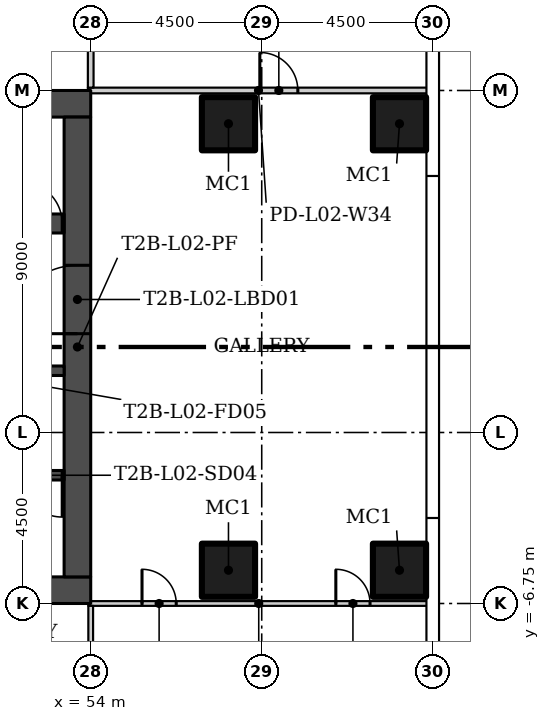
"""IFC4 building model, lengths in metres.
Left out: names, types, materials, properties, quantities, classifications, styles, units other than length and angle.
Written with IfcOpenShell. Run it as: python <this file> out.ifc"""

import sys

from ifc_helpers import new_model, si_unit, direction, frame, frame_2d, origin, origin_2d, place, context, subcontext, project, spatial, rectangle, hollow_rectangle, extrude, element, fill, save


model = new_model("IFC4")
c1 = context("Model", 3, precision=1e-05, world=origin(), true_north=direction((0.0, 1.0)))
c2 = subcontext(c1, "Body", "Model", "MODEL_VIEW")
j1 = project(units=[si_unit("LENGTHUNIT", "METRE"), si_unit("PLANEANGLEUNIT", "RADIAN")], contexts=[c1])
p1 = place(None, origin())
s1 = spatial("IfcSite", under=j1, at=p1, CompositionType="ELEMENT")
p2 = place(p1, origin())
s2 = spatial("IfcBuilding", under=s1, at=p2, CompositionType="ELEMENT")
p3 = place(p2, frame((0.0, 0.0, 12.5)))
s3 = spatial("IfcBuildingStorey", under=s2, at=p3, CompositionType="ELEMENT", Elevation=12.5)
for number, where in (
    (1, (57.625, -5.875, 0.0)),
    (2, (62.125, -5.875, 0.0)),
    (3, (57.625, 5.875, 0.0)),
    (4, (62.125, 5.875, 0.0)),
):
    element("IfcColumn", number, at=place(p3, frame(where)), inside=s3, PredefinedType="COLUMN", context=c2, shape_type="SweptSolid", body=[
        extrude(hollow_rectangle(XDim=1.4, YDim=1.4, WallThickness=0.06, at=origin_2d()), origin(), (0.0, 0.0, 1.0), 5.6),
    ])
p4 = place(p3, frame((53.938, -6.75, 0.0)))
e5 = element("IfcWall", 5, at=p4, inside=s3, PredefinedType="PARTITIONING", context=c2, shape_type="SweptSolid", body=[
    extrude(rectangle(XDim=8.968, YDim=0.125, at=frame_2d((4.484, 0.0))), origin(), (0.0, 0.0, 1.0), 5.6),
])
p5 = place(p4, frame((1.413, 0.0, 0.0)))
e6 = element("IfcOpeningElement", 6, at=p5, cuts=e5, PredefinedType="OPENING", context=c2, shape_type="SweptSolid", body=[
    extrude(rectangle(XDim=0.9, YDim=2.1, at=frame_2d((0.45, 1.05))), frame((0.0, 0.073, 0.0), z_axis=(0.0, -1.0, 0.0), x_axis=(1.0, 0.0, 0.0)), (0.0, 0.0, 1.0), 0.145),
])
p6 = place(p4, frame((6.512, 0.0, 0.0)))
e7 = element("IfcOpeningElement", 7, at=p6, cuts=e5, PredefinedType="OPENING", context=c2, shape_type="SweptSolid", body=[
    extrude(rectangle(XDim=0.9, YDim=2.1, at=frame_2d((0.45, 1.05))), frame((0.0, 0.073, 0.0), z_axis=(0.0, -1.0, 0.0), x_axis=(1.0, 0.0, 0.0)), (0.0, 0.0, 1.0), 0.145),
])
p7 = place(p3, frame((53.925, 6.75, 0.0)))
e8 = element("IfcWall", 8, at=p7, inside=s3, PredefinedType="PARTITIONING", context=c2, shape_type="SweptSolid", body=[
    extrude(rectangle(XDim=8.98, YDim=0.15, at=frame_2d((4.49, 0.0))), origin(), (0.0, 0.0, 1.0), 5.6),
])
p8 = place(p7, frame((4.525, 0.0, 0.0)))
e9 = element("IfcOpeningElement", 9, at=p8, cuts=e8, PredefinedType="OPENING", context=c2, shape_type="SweptSolid", body=[
    extrude(rectangle(XDim=1.0, YDim=2.4, at=frame_2d((0.5, 1.2))), frame((0.0, 0.085, 0.0), z_axis=(0.0, -1.0, 0.0), x_axis=(1.0, 0.0, 0.0)), (0.0, 0.0, 1.0), 0.17),
])
p9 = place(p3, frame((54.0, -6.812, 0.0), z_axis=(0.0, 0.0, 1.0), x_axis=(0.0, -1.0, 0.0)))
e10 = element("IfcWall", 10, at=p9, inside=s3, PredefinedType="PARTITIONING", context=c2, shape_type="SweptSolid", body=[
    extrude(rectangle(XDim=13.337, YDim=0.125, at=frame_2d((6.669, 0.0))), origin(), (0.0, 0.0, 1.0), 5.6),
])
p10 = place(p3, frame((54.0, 15.65, 0.0), z_axis=(0.0, 0.0, 1.0), x_axis=(0.0, -1.0, 0.0)))
e11 = element("IfcWall", 11, at=p10, inside=s3, PredefinedType="PARTITIONING", context=c2, shape_type="SweptSolid", body=[
    extrude(rectangle(XDim=8.825, YDim=0.15, at=frame_2d((4.413, 0.0))), origin(), (0.0, 0.0, 1.0), 5.6),
])
for number, where, z_axis, x_axis in (
    (12, (54.0, -6.4, 0.0), (0.0, 0.0, 1.0), (-1.0, 0.0, 0.0)),
    (13, (54.0, 6.4, 0.0), (0.0, 0.0, 1.0), (-1.0, 0.0, 0.0)),
):
    element("IfcWall", number, at=place(p3, frame(where, z_axis=z_axis, x_axis=x_axis)), inside=s3, PredefinedType="SHEAR", context=c2, shape_type="SweptSolid", body=[
        extrude(rectangle(XDim=13.5, YDim=0.7, at=frame_2d((6.75, 0.0))), origin(), (0.0, 0.0, 1.0), 5.6),
    ])
p11 = place(p3, frame((53.65, -6.05, 0.0), z_axis=(0.0, 0.0, 1.0), x_axis=(0.0, 1.0, 0.0)))
e14 = element("IfcWall", 14, at=p11, inside=s3, PredefinedType="SHEAR", context=c2, shape_type="SweptSolid", body=[
    extrude(rectangle(XDim=12.1, YDim=0.7, at=frame_2d((6.05, 0.0))), origin(), (0.0, 0.0, 1.0), 5.6),
])
p12 = place(p11, frame((6.4, 0.0, 0.0)))
e15 = element("IfcOpeningElement", 15, at=p12, cuts=e14, PredefinedType="OPENING", context=c2, shape_type="SweptSolid", body=[
    extrude(rectangle(XDim=1.8, YDim=2.4, at=frame_2d((0.9, 1.2))), frame((0.0, 0.36, 0.0), z_axis=(0.0, -1.0, 0.0), x_axis=(1.0, 0.0, 0.0)), (0.0, 0.0, 1.0), 0.72),
])
p13 = place(p3, frame((53.3, -3.375, 0.0), z_axis=(0.0, 0.0, 1.0), x_axis=(-1.0, 0.0, 0.0)))
e16 = element("IfcWall", 16, at=p13, inside=s3, PredefinedType="SHEAR", context=c2, shape_type="SweptSolid", body=[
    extrude(rectangle(XDim=12.1, YDim=0.25, at=frame_2d((6.05, 0.0))), origin(), (0.0, 0.0, 1.0), 5.6),
])
p14 = place(p13, frame((0.05, 0.0, 0.0)))
e17 = element("IfcOpeningElement", 17, at=p14, cuts=e16, PredefinedType="OPENING", context=c2, shape_type="SweptSolid", body=[
    extrude(rectangle(XDim=1.1, YDim=2.1, at=frame_2d((0.55, 1.05))), frame((0.0, 0.135, 0.0), z_axis=(0.0, -1.0, 0.0), x_axis=(1.0, 0.0, 0.0)), (0.0, 0.0, 1.0), 0.27),
])
p15 = place(p3, frame((53.3, -0.625, 0.0), z_axis=(0.0, 0.0, 1.0), x_axis=(-1.0, 0.0, 0.0)))
e18 = element("IfcWall", 18, at=p15, inside=s3, PredefinedType="SHEAR", context=c2, shape_type="SweptSolid", body=[
    extrude(rectangle(XDim=12.1, YDim=0.25, at=frame_2d((6.05, 0.0))), origin(), (0.0, 0.0, 1.0), 5.6),
])
p16 = place(p15, frame((2.25, 0.0, 0.0)))
e19 = element("IfcOpeningElement", 19, at=p16, cuts=e18, PredefinedType="OPENING", context=c2, shape_type="SweptSolid", body=[
    extrude(rectangle(XDim=1.2, YDim=2.1, at=frame_2d((0.6, 1.05))), frame((0.0, 0.135, 0.0), z_axis=(0.0, -1.0, 0.0), x_axis=(1.0, 0.0, 0.0)), (0.0, 0.0, 1.0), 0.27),
])
p17 = place(p15, frame((9.05, 0.0, 0.0)))
e20 = element("IfcOpeningElement", 20, at=p17, cuts=e18, PredefinedType="OPENING", context=c2, shape_type="SweptSolid", body=[
    extrude(rectangle(XDim=0.9, YDim=2.1, at=frame_2d((0.45, 1.05))), frame((0.0, 0.135, 0.0), z_axis=(0.0, -1.0, 0.0), x_axis=(1.0, 0.0, 0.0)), (0.0, 0.0, 1.0), 0.27),
])
p18 = place(p15, frame((10.675, 0.0, 0.0)))
e21 = element("IfcOpeningElement", 21, at=p18, cuts=e18, PredefinedType="OPENING", context=c2, shape_type="SweptSolid", body=[
    extrude(rectangle(XDim=0.9, YDim=2.1, at=frame_2d((0.45, 1.05))), frame((0.0, 0.135, 0.0), z_axis=(0.0, -1.0, 0.0), x_axis=(1.0, 0.0, 0.0)), (0.0, 0.0, 1.0), 0.27),
])
p19 = place(p3, frame((46.0, 3.25, 0.0)))
e22 = element("IfcWall", 22, at=p19, inside=s3, PredefinedType="SHEAR", context=c2, shape_type="SweptSolid", body=[
    extrude(rectangle(XDim=7.3, YDim=0.5, at=frame_2d((3.65, 0.0))), origin(), (0.0, 0.0, 1.0), 5.6),
])
p20 = place(p19, frame((6.15, 0.0, 0.0)))
e23 = element("IfcOpeningElement", 23, at=p20, cuts=e22, PredefinedType="OPENING", context=c2, shape_type="SweptSolid", body=[
    extrude(rectangle(XDim=1.1, YDim=2.1, at=frame_2d((0.55, 1.05))), frame((0.0, 0.26, 0.0), z_axis=(0.0, -1.0, 0.0), x_axis=(1.0, 0.0, 0.0)), (0.0, 0.0, 1.0), 0.52),
])
p21 = place(p5, origin())
e24 = element("IfcDoor", 24, at=p21, inside=s3, OperationType="SINGLE_SWING_LEFT", PredefinedType="DOOR", context=c2, shape_type="SweptSolid", body=[
    extrude(rectangle(XDim=0.9, YDim=2.1, at=frame_2d((0.45, 1.05))), frame((0.0, 0.025, 0.0), z_axis=(0.0, -1.0, 0.0), x_axis=(1.0, 0.0, 0.0)), (0.0, 0.0, 1.0), 0.05),
])
fill(e6, e24)
p22 = place(p6, origin())
e25 = element("IfcDoor", 25, at=p22, inside=s3, OperationType="SINGLE_SWING_RIGHT", PredefinedType="DOOR", context=c2, shape_type="SweptSolid", body=[
    extrude(rectangle(XDim=0.9, YDim=2.1, at=frame_2d((0.45, 1.05))), frame((0.0, 0.025, 0.0), z_axis=(0.0, -1.0, 0.0), x_axis=(1.0, 0.0, 0.0)), (0.0, 0.0, 1.0), 0.05),
])
fill(e7, e25)
p23 = place(p8, origin())
e26 = element("IfcDoor", 26, at=p23, inside=s3, OperationType="SINGLE_SWING_RIGHT", PredefinedType="DOOR", context=c2, shape_type="SweptSolid", body=[
    extrude(rectangle(XDim=1.0, YDim=2.4, at=frame_2d((0.5, 1.2))), frame((0.0, 0.025, 0.0), z_axis=(0.0, -1.0, 0.0), x_axis=(1.0, 0.0, 0.0)), (0.0, 0.0, 1.0), 0.05),
])
fill(e9, e26)
p24 = place(p12, origin())
e27 = element("IfcDoor", 27, at=p24, inside=s3, OperationType="DOUBLE_DOOR_SINGLE_SWING", PredefinedType="DOOR", context=c2, shape_type="SweptSolid", body=[
    extrude(rectangle(XDim=1.8, YDim=2.4, at=frame_2d((0.9, 1.2))), frame((0.0, 0.025, 0.0), z_axis=(0.0, -1.0, 0.0), x_axis=(1.0, 0.0, 0.0)), (0.0, 0.0, 1.0), 0.05),
])
fill(e15, e27)
p25 = place(p14, origin())
e28 = element("IfcDoor", 28, at=p25, inside=s3, OperationType="SINGLE_SWING_LEFT", PredefinedType="DOOR", context=c2, shape_type="SweptSolid", body=[
    extrude(rectangle(XDim=1.1, YDim=2.1, at=frame_2d((0.55, 1.05))), frame((0.0, 0.025, 0.0), z_axis=(0.0, -1.0, 0.0), x_axis=(1.0, 0.0, 0.0)), (0.0, 0.0, 1.0), 0.05),
])
fill(e17, e28)
p26 = place(p20, origin())
e29 = element("IfcDoor", 29, at=p26, inside=s3, OperationType="SINGLE_SWING_RIGHT", PredefinedType="DOOR", context=c2, shape_type="SweptSolid", body=[
    extrude(rectangle(XDim=1.1, YDim=2.1, at=frame_2d((0.55, 1.05))), frame((0.0, 0.025, 0.0), z_axis=(0.0, -1.0, 0.0), x_axis=(1.0, 0.0, 0.0)), (0.0, 0.0, 1.0), 0.05),
])
fill(e23, e29)
save(model, sys.argv[1])
